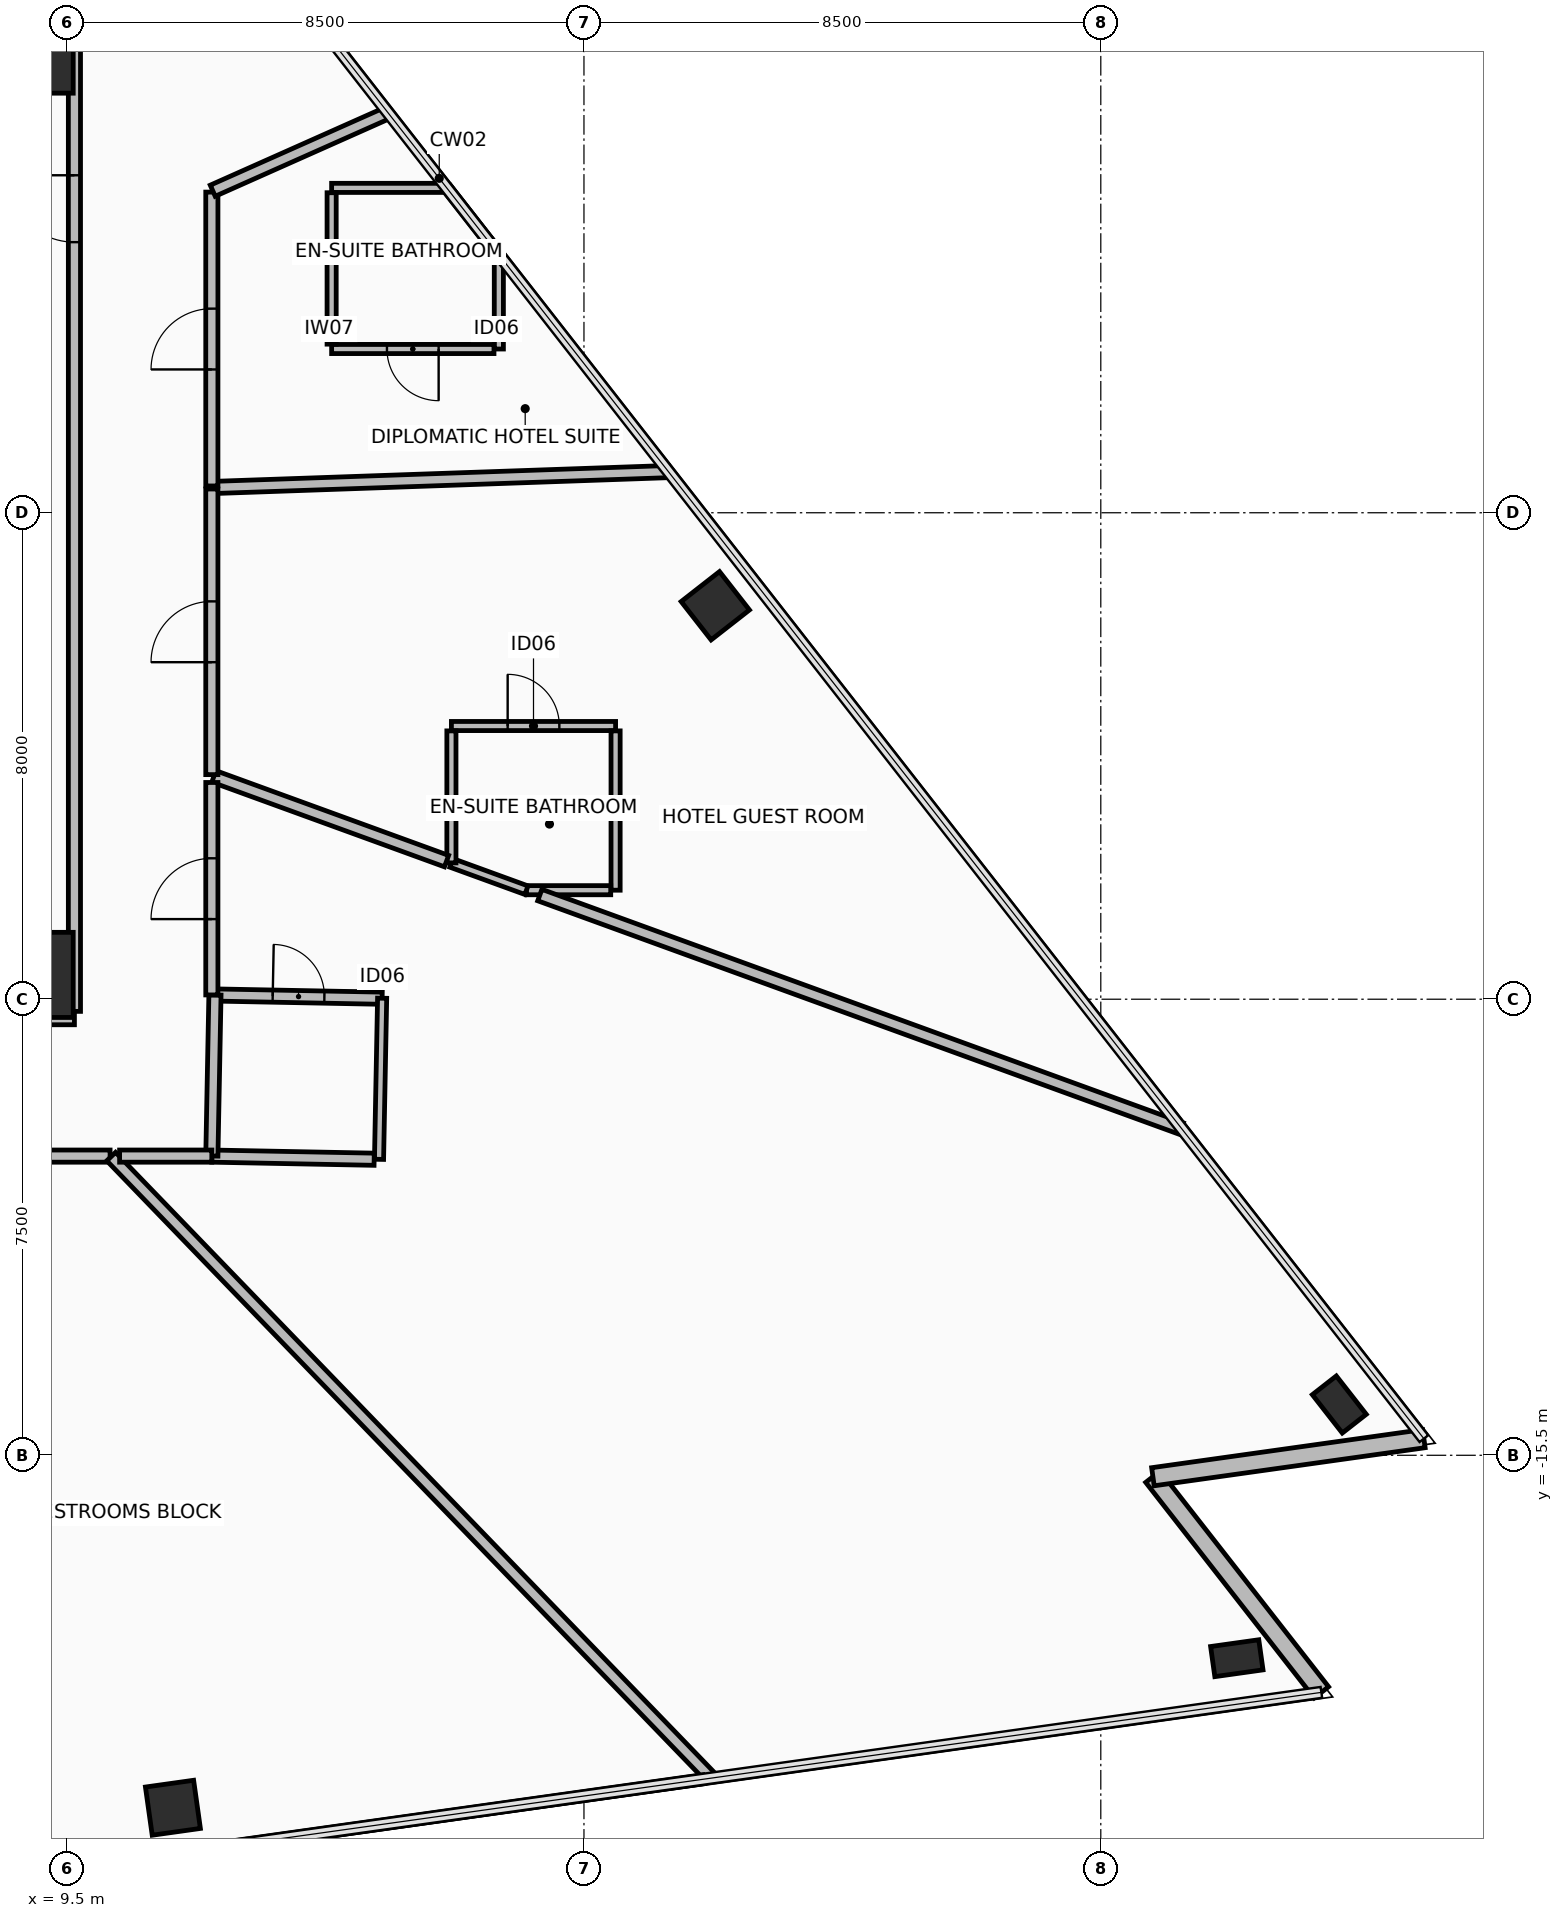
"""IFC4 building model, lengths in metres.
Left out: names, types, materials, properties, quantities, classifications, styles, units other than length and angle.
Written with IfcOpenShell. Run it as: python <this file> out.ifc"""

import sys

from ifc_helpers import new_model, si_unit, direction, frame, frame_2d, origin, origin_2d, place, context, subcontext, project, spatial, rectangle, hollow_rectangle, extrude, element, fill, save


model = new_model("IFC4")
c1 = context("Model", 3, precision=1e-05, world=origin(), true_north=direction((0.0, 1.0)))
c2 = subcontext(c1, "Body", "Model", "MODEL_VIEW")
j1 = project(units=[si_unit("LENGTHUNIT", "METRE"), si_unit("PLANEANGLEUNIT", "RADIAN")], contexts=[c1])
p1 = place(None, origin())
s1 = spatial("IfcSite", under=j1, at=p1, CompositionType="ELEMENT")
p2 = place(p1, origin())
s2 = spatial("IfcBuilding", under=s1, at=p2, CompositionType="ELEMENT")
p3 = place(p2, frame((0.0, 0.0, 63.85)))
s3 = spatial("IfcBuildingStorey", under=s2, at=p3, CompositionType="ELEMENT", Elevation=63.85)
for number, where, z_axis, x_axis in (
    (1, (8.9, -7.6, 0.0), (0.0, 0.0, 1.0), (1.0, 0.0, 0.0)),
    (2, (8.9, 7.6, 0.0), (0.0, 0.0, 1.0), (1.0, 0.0, 0.0)),
):
    element("IfcColumn", number, at=place(p3, frame(where, z_axis=z_axis, x_axis=x_axis)), inside=s3, PredefinedType="COLUMN", context=c2, shape_type="SweptSolid", body=[
        extrude(rectangle(XDim=1.4, YDim=1.4, at=origin_2d()), origin(), (0.0, 0.0, 1.0), 3.45),
    ])
p4 = place(p3, frame((11.24, -21.296, 0.0), z_axis=(0.0, 0.0, 1.0), x_axis=(0.990268068742, 0.13917310096, 0.0)))
e3 = element("IfcColumn", 3, at=p4, inside=s3, PredefinedType="COLUMN", context=c2, shape_type="SweptSolid", body=[
    extrude(hollow_rectangle(XDim=0.8, YDim=0.8, WallThickness=0.045, at=origin_2d()), origin(), (0.0, 0.0, 1.0), 3.45),
])
for number, where, z_axis, x_axis in (
    (4, (28.737, -18.837, 0.0), (0.0, 0.0, 1.0), (0.99, 0.139, 0.0)),
    (5, (30.423, -14.665, 0.0), (0.0, 0.0, 1.0), (-0.616, 0.788, 0.0)),
):
    element("IfcColumn", number, at=place(p3, frame(where, z_axis=z_axis, x_axis=x_axis)), inside=s3, PredefinedType="COLUMN", context=c2, shape_type="SweptSolid", body=[
        extrude(hollow_rectangle(XDim=0.5, YDim=0.8, WallThickness=0.04, at=origin_2d()), origin(), (0.0, 0.0, 1.0), 3.45),
    ])
p5 = place(p3, frame((20.16, -1.529, 0.0), z_axis=(0.0, 0.0, 1.0), x_axis=(-0.615661475326, 0.788010753607, 0.0)))
e6 = element("IfcColumn", 6, at=p5, inside=s3, PredefinedType="COLUMN", context=c2, shape_type="SweptSolid", body=[
    extrude(hollow_rectangle(XDim=0.8, YDim=0.8, WallThickness=0.045, at=origin_2d()), origin(), (0.0, 0.0, 1.0), 3.45),
])
p6 = place(p3, frame((30.128, -19.399, 0.0), z_axis=(0.0, 0.0, 1.0), x_axis=(-0.615621932091, 0.78804164657, 0.0)))
e7 = element("IfcWall", 7, at=p6, inside=s3, PredefinedType="STANDARD", context=c2, shape_type="SweptSolid", body=[
    extrude(rectangle(XDim=4.5, YDim=0.3, at=frame_2d((2.25, 0.0))), origin(), (0.0, 0.0, 1.0), 2.47),
])
p7 = place(p3, frame((27.357, -15.853, 0.0), z_axis=(0.0, 0.0, 1.0), x_axis=(0.990269200152, 0.139165050317, 0.0)))
e8 = element("IfcWall", 8, at=p7, inside=s3, PredefinedType="STANDARD", context=c2, shape_type="SweptSolid", body=[
    extrude(rectangle(XDim=4.5, YDim=0.3, at=frame_2d((2.25, 0.0))), origin(), (0.0, 0.0, 1.0), 2.47),
])
p8 = place(p3, frame((-9.62, -8.32, 0.0), z_axis=(0.0, 0.0, 1.0), x_axis=(1.0, 0.0, 0.0)))
e9 = element("IfcWall", 9, at=p8, inside=s3, PredefinedType="PARTITIONING", context=c2, shape_type="SweptSolid", body=[
    extrude(rectangle(XDim=19.24, YDim=0.2, at=frame_2d((9.62, 0.0))), origin(), (0.0, 0.0, 1.0), 2.67),
])
p9 = place(p8, frame((15.02, 0.0, 0.0)))
e10 = element("IfcOpeningElement", 10, at=p9, cuts=e9, PredefinedType="OPENING", context=c2, shape_type="SweptSolid", body=[
    extrude(rectangle(XDim=0.9, YDim=2.1, at=frame_2d((0.45, 1.05))), frame((0.0, 0.11, 0.0), z_axis=(0.0, -1.0, 0.0), x_axis=(1.0, 0.0, 0.0)), (0.0, 0.0, 1.0), 0.22),
])
p10 = place(p3, frame((9.62, -8.2, 0.0), z_axis=(0.0, 0.0, 1.0), x_axis=(0.0, 1.0, 0.0)))
e11 = element("IfcWall", 11, at=p10, inside=s3, PredefinedType="PARTITIONING", context=c2, shape_type="SweptSolid", body=[
    extrude(rectangle(XDim=16.4, YDim=0.2, at=frame_2d((8.2, 0.0))), origin(), (0.0, 0.0, 1.0), 2.67),
])
p11 = place(p10, frame((12.65, 0.0, 0.0)))
e12 = element("IfcOpeningElement", 12, at=p11, cuts=e11, PredefinedType="OPENING", context=c2, shape_type="SweptSolid", body=[
    extrude(rectangle(XDim=1.1, YDim=2.15, at=frame_2d((0.55, 1.075))), frame((0.0, 0.11, 0.0), z_axis=(0.0, -1.0, 0.0), x_axis=(1.0, 0.0, 0.0)), (0.0, 0.0, 1.0), 0.22),
])
p12 = place(p3, frame((13.85, 5.343, 0.0), z_axis=(0.0, 0.0, 1.0), x_axis=(1.0, 0.0, 0.0)))
e13 = element("IfcWall", 13, at=p12, inside=s3, PredefinedType="PARTITIONING", context=c2, shape_type="SweptSolid", body=[
    extrude(rectangle(XDim=1.893, YDim=0.15, at=frame_2d((0.946, 0.0))), origin(), (0.0, 0.0, 1.0), 2.47),
])
p13 = place(p3, frame((15.743, 5.343, 0.0), z_axis=(0.0, 0.0, 1.0), x_axis=(0.615650847495, -0.788019056862, 0.0)))
e14 = element("IfcWall", 14, at=p13, inside=s3, PredefinedType="PARTITIONING", context=c2, shape_type="SweptSolid", body=[
    extrude(rectangle(XDim=1.392, YDim=0.15, at=frame_2d((0.696, 0.0))), origin(), (0.0, 0.0, 1.0), 3.275),
])
p14 = place(p3, frame((16.6, 4.246, 0.0), z_axis=(0.0, 0.0, 1.0), x_axis=(0.0, -1.0, 0.0)))
e15 = element("IfcWall", 15, at=p14, inside=s3, PredefinedType="PARTITIONING", context=c2, shape_type="SweptSolid", body=[
    extrude(rectangle(XDim=1.553, YDim=0.15, at=frame_2d((0.776, 0.0))), origin(), (0.0, 0.0, 1.0), 2.47),
])
p15 = place(p3, frame((16.52, 2.693, 0.0), z_axis=(0.0, 0.0, 1.0), x_axis=(-1.0, 0.0, 0.0)))
e16 = element("IfcWall", 16, at=p15, inside=s3, PredefinedType="PARTITIONING", context=c2, shape_type="SweptSolid", body=[
    extrude(rectangle(XDim=2.67, YDim=0.15, at=frame_2d((1.335, 0.0))), origin(), (0.0, 0.0, 1.0), 3.275),
])
p16 = place(p15, frame((0.91, 0.0, 0.0)))
e17 = element("IfcOpeningElement", 17, at=p16, cuts=e16, PredefinedType="OPENING", context=c2, shape_type="SweptSolid", body=[
    extrude(rectangle(XDim=0.85, YDim=2.1, at=frame_2d((0.425, 1.05))), frame((0.0, 0.085, 0.0), z_axis=(0.0, -1.0, 0.0), x_axis=(1.0, 0.0, 0.0)), (0.0, 0.0, 1.0), 0.17),
])
p17 = place(p3, frame((13.85, 2.773, 0.0), z_axis=(0.0, 0.0, 1.0), x_axis=(0.0, 1.0, 0.0)))
e18 = element("IfcWall", 18, at=p17, inside=s3, PredefinedType="PARTITIONING", context=c2, shape_type="SweptSolid", body=[
    extrude(rectangle(XDim=2.49, YDim=0.15, at=frame_2d((1.245, 0.0))), origin(), (0.0, 0.0, 1.0), 3.275),
])
p18 = place(p3, frame((11.931, -7.93, 0.0), z_axis=(0.0, 0.0, 1.0), x_axis=(0.999812703389, -0.019353504647, 0.0)))
e19 = element("IfcWall", 19, at=p18, inside=s3, PredefinedType="PARTITIONING", context=c2, shape_type="SweptSolid", body=[
    extrude(rectangle(XDim=2.75, YDim=0.2, at=frame_2d((1.375, 0.0))), origin(), (0.0, 0.0, 1.0), 3.275),
])
p19 = place(p18, frame((0.95, 0.0, 0.0)))
e20 = element("IfcOpeningElement", 20, at=p19, cuts=e19, PredefinedType="OPENING", context=c2, shape_type="SweptSolid", body=[
    extrude(rectangle(XDim=0.85, YDim=2.1, at=frame_2d((0.425, 1.05))), frame((0.0, 0.11, 0.0), z_axis=(0.0, -1.0, 0.0), x_axis=(1.0, 0.0, 0.0)), (0.0, 0.0, 1.0), 0.22),
])
p20 = place(p3, frame((14.681, -7.984, 0.0), z_axis=(0.0, 0.0, 1.0), x_axis=(-0.01934764942, -0.999812816712, 0.0)))
e21 = element("IfcWall", 21, at=p20, inside=s3, PredefinedType="PARTITIONING", context=c2, shape_type="SweptSolid", body=[
    extrude(rectangle(XDim=2.65, YDim=0.15, at=frame_2d((1.325, 0.0))), origin(), (0.0, 0.0, 1.0), 2.67),
])
p21 = place(p3, frame((14.55, -10.632, 0.0), z_axis=(0.0, 0.0, 1.0), x_axis=(-0.999813887268, 0.019292247848, 0.0)))
e22 = element("IfcWall", 22, at=p21, inside=s3, PredefinedType="PARTITIONING", context=c2, shape_type="SweptSolid", body=[
    extrude(rectangle(XDim=2.67, YDim=0.2, at=frame_2d((1.335, 0.0))), origin(), (0.0, 0.0, 1.0), 2.67),
])
p22 = place(p3, frame((11.88, -10.579, 0.0), z_axis=(0.0, 0.0, 1.0), x_axis=(0.019356564513, 0.999812644154, 0.0)))
e23 = element("IfcWall", 23, at=p22, inside=s3, PredefinedType="PARTITIONING", context=c2, shape_type="SweptSolid", body=[
    extrude(rectangle(XDim=2.649, YDim=0.2, at=frame_2d((1.324, 0.0))), origin(), (0.0, 0.0, 1.0), 2.67),
])
p23 = place(p3, frame((15.82, -3.507, 0.0), z_axis=(0.0, 0.0, 1.0), x_axis=(1.0, 0.0, 0.0)))
e24 = element("IfcWall", 24, at=p23, inside=s3, PredefinedType="PARTITIONING", context=c2, shape_type="SweptSolid", body=[
    extrude(rectangle(XDim=2.7, YDim=0.15, at=frame_2d((1.35, 0.0))), origin(), (0.0, 0.0, 1.0), 2.67),
])
p24 = place(p23, frame((0.925, 0.0, 0.0)))
e25 = element("IfcOpeningElement", 25, at=p24, cuts=e24, PredefinedType="OPENING", context=c2, shape_type="SweptSolid", body=[
    extrude(rectangle(XDim=0.85, YDim=2.1, at=frame_2d((0.425, 1.05))), frame((0.0, 0.085, 0.0), z_axis=(0.0, -1.0, 0.0), x_axis=(1.0, 0.0, 0.0)), (0.0, 0.0, 1.0), 0.17),
])
p25 = place(p3, frame((18.52, -3.587, 0.0), z_axis=(0.0, 0.0, 1.0), x_axis=(0.0, -1.0, 0.0)))
e26 = element("IfcWall", 26, at=p25, inside=s3, PredefinedType="PARTITIONING", context=c2, shape_type="SweptSolid", body=[
    extrude(rectangle(XDim=2.62, YDim=0.15, at=frame_2d((1.31, 0.0))), origin(), (0.0, 0.0, 1.0), 2.87),
])
p26 = place(p3, frame((18.44, -6.207, 0.0), z_axis=(0.0, 0.0, 1.0), x_axis=(-1.0, 0.0, 0.0)))
e27 = element("IfcWall", 27, at=p26, inside=s3, PredefinedType="PARTITIONING", context=c2, shape_type="SweptSolid", body=[
    extrude(rectangle(XDim=1.386, YDim=0.15, at=frame_2d((0.693, 0.0))), origin(), (0.0, 0.0, 1.0), 3.275),
])
p27 = place(p3, frame((17.054, -6.207, 0.0), z_axis=(0.0, 0.0, 1.0), x_axis=(-0.939663072244, 0.342101316369, 0.0)))
e28 = element("IfcWall", 28, at=p27, inside=s3, PredefinedType="PARTITIONING", context=c2, shape_type="SweptSolid", body=[
    extrude(rectangle(XDim=1.313, YDim=0.15, at=frame_2d((0.657, 0.0))), origin(), (0.0, 0.0, 1.0), 3.275),
])
p28 = place(p3, frame((15.82, -5.758, 0.0), z_axis=(0.0, 0.0, 1.0), x_axis=(0.0, 1.0, 0.0)))
e29 = element("IfcWall", 29, at=p28, inside=s3, PredefinedType="PARTITIONING", context=c2, shape_type="SweptSolid", body=[
    extrude(rectangle(XDim=2.171, YDim=0.15, at=frame_2d((1.085, 0.0))), origin(), (0.0, 0.0, 1.0), 2.67),
])
p29 = place(p3, frame((3.472, -10.58, 0.0), z_axis=(0.0, 0.0, 1.0), x_axis=(1.0, 0.0, 0.0)))
e30 = element("IfcWall", 30, at=p29, inside=s3, PredefinedType="PARTITIONING", context=c2, shape_type="SweptSolid", body=[
    extrude(rectangle(XDim=6.734, YDim=0.2, at=frame_2d((3.367, 0.0))), origin(), (0.0, 0.0, 1.0), 2.67),
])
p30 = place(p29, frame((2.942, 0.0, 0.0)))
e31 = element("IfcOpeningElement", 31, at=p30, cuts=e30, PredefinedType="OPENING", context=c2, shape_type="SweptSolid", body=[
    extrude(rectangle(XDim=0.85, YDim=2.1, at=frame_2d((0.425, 1.05))), frame((0.0, 0.11, 0.0), z_axis=(0.0, -1.0, 0.0), x_axis=(1.0, 0.0, 0.0)), (0.0, 0.0, 1.0), 0.22),
])
p31 = place(p3, frame((10.224, -10.588, 0.0), z_axis=(0.0, 0.0, 1.0), x_axis=(0.694662887415, -0.719335438337, 0.0)))
e32 = element("IfcWall", 32, at=p31, inside=s3, PredefinedType="PARTITIONING", context=c2, shape_type="SweptSolid", body=[
    extrude(rectangle(XDim=14.209, YDim=0.2, at=frame_2d((7.105, 0.0))), origin(), (0.0, 0.0, 1.0), 2.47),
])
p32 = place(p3, frame((19.967, -20.827, 0.0), z_axis=(0.0, 0.0, 1.0), x_axis=(-0.990266579607, -0.139183696289, 0.0)))
e33 = element("IfcWall", 33, at=p32, inside=s3, PredefinedType="PARTITIONING", context=c2, shape_type="SweptSolid", body=[
    extrude(rectangle(XDim=12.726, YDim=0.15, at=frame_2d((6.363, 0.0))), origin(), (0.0, 0.0, 1.0), 3.275),
])
p33 = place(p3, frame((19.388, 0.677, 0.0), z_axis=(0.0, 0.0, 1.0), x_axis=(-0.999391073602, -0.034892434782, 0.0)))
e34 = element("IfcWall", 34, at=p33, inside=s3, PredefinedType="PARTITIONING", context=c2, shape_type="SweptSolid", body=[
    extrude(rectangle(XDim=7.487, YDim=0.2, at=frame_2d((3.743, 0.0))), origin(), (0.0, 0.0, 1.0), 2.47),
])
p34 = place(p3, frame((11.88, 0.441, 0.0), z_axis=(0.0, 0.0, 1.0), x_axis=(0.0, 1.0, 0.0)))
e35 = element("IfcWall", 35, at=p34, inside=s3, PredefinedType="PARTITIONING", context=c2, shape_type="SweptSolid", body=[
    extrude(rectangle(XDim=4.833, YDim=0.2, at=frame_2d((2.416, 0.0))), origin(), (0.0, 0.0, 1.0), 2.87),
])
p35 = place(p34, frame((1.916, 0.0, 0.0)))
e36 = element("IfcOpeningElement", 36, at=p35, cuts=e35, PredefinedType="OPENING", context=c2, shape_type="SweptSolid", body=[
    extrude(rectangle(XDim=1.0, YDim=2.15, at=frame_2d((0.5, 1.075))), frame((0.0, 0.11, 0.0), z_axis=(0.0, -1.0, 0.0), x_axis=(1.0, 0.0, 0.0)), (0.0, 0.0, 1.0), 0.22),
])
p36 = place(p3, frame((11.895, 5.296, 0.0), z_axis=(0.0, 0.0, 1.0), x_axis=(0.91355769443, 0.406709157689, 0.0)))
e37 = element("IfcWall", 37, at=p36, inside=s3, PredefinedType="PARTITIONING", context=c2, shape_type="SweptSolid", body=[
    extrude(rectangle(XDim=3.135, YDim=0.2, at=frame_2d((1.568, 0.0))), origin(), (0.0, 0.0, 1.0), 2.47),
])
p37 = place(p3, frame((11.914, -4.336, 0.0), z_axis=(0.0, 0.0, 1.0), x_axis=(0.93968309138, -0.342046324017, 0.0)))
e38 = element("IfcWall", 38, at=p37, inside=s3, PredefinedType="PARTITIONING", context=c2, shape_type="SweptSolid", body=[
    extrude(rectangle(XDim=4.072, YDim=0.2, at=frame_2d((2.036, 0.0))), origin(), (0.0, 0.0, 1.0), 2.67),
])
p38 = place(p3, frame((17.274, -6.287, 0.0), z_axis=(0.0, 0.0, 1.0), x_axis=(0.939692436803, -0.342020648814, 0.0)))
e39 = element("IfcWall", 39, at=p38, inside=s3, PredefinedType="PARTITIONING", context=c2, shape_type="SweptSolid", body=[
    extrude(rectangle(XDim=11.228, YDim=0.2, at=frame_2d((5.614, 0.0))), origin(), (0.0, 0.0, 1.0), 2.47),
])
p39 = place(p3, frame((10.363, -10.58, 0.0), z_axis=(0.0, 0.0, 1.0), x_axis=(1.0, 0.0, 0.0)))
e40 = element("IfcWall", 40, at=p39, inside=s3, PredefinedType="PARTITIONING", context=c2, shape_type="SweptSolid", body=[
    extrude(rectangle(XDim=1.516, YDim=0.2, at=frame_2d((0.758, 0.0))), origin(), (0.0, 0.0, 1.0), 3.275),
])
p40 = place(p3, frame((11.88, -7.929, 0.0), z_axis=(0.0, 0.0, 1.0), x_axis=(0.0, 1.0, 0.0)))
e41 = element("IfcWall", 41, at=p40, inside=s3, PredefinedType="PARTITIONING", context=c2, shape_type="SweptSolid", body=[
    extrude(rectangle(XDim=3.494, YDim=0.2, at=frame_2d((1.747, 0.0))), origin(), (0.0, 0.0, 1.0), 2.67),
])
p41 = place(p40, frame((1.247, 0.0, 0.0)))
e42 = element("IfcOpeningElement", 42, at=p41, cuts=e41, PredefinedType="OPENING", context=c2, shape_type="SweptSolid", body=[
    extrude(rectangle(XDim=1.0, YDim=2.15, at=frame_2d((0.5, 1.075))), frame((0.0, 0.11, 0.0), z_axis=(0.0, -1.0, 0.0), x_axis=(1.0, 0.0, 0.0)), (0.0, 0.0, 1.0), 0.22),
])
p42 = place(p3, frame((11.88, -4.306, 0.0), z_axis=(0.0, 0.0, 1.0), x_axis=(0.0, 1.0, 0.0)))
e43 = element("IfcWall", 43, at=p42, inside=s3, PredefinedType="PARTITIONING", context=c2, shape_type="SweptSolid", body=[
    extrude(rectangle(XDim=4.697, YDim=0.2, at=frame_2d((2.349, 0.0))), origin(), (0.0, 0.0, 1.0), 3.275),
])
p43 = place(p42, frame((1.849, 0.0, 0.0)))
e44 = element("IfcOpeningElement", 44, at=p43, cuts=e43, PredefinedType="OPENING", context=c2, shape_type="SweptSolid", body=[
    extrude(rectangle(XDim=1.0, YDim=2.15, at=frame_2d((0.5, 1.075))), frame((0.0, 0.11, 0.0), z_axis=(0.0, -1.0, 0.0), x_axis=(1.0, 0.0, 0.0)), (0.0, 0.0, 1.0), 0.22),
])
p44 = place(p11, frame((1.1, 0.0, 0.0), z_axis=(0.0, 0.0, 1.0), x_axis=(-1.0, 0.0, 0.0)))
e45 = element("IfcDoor", 45, at=p44, inside=s3, OperationType="SINGLE_SWING_LEFT", PredefinedType="DOOR", context=c2, shape_type="SweptSolid", body=[
    extrude(rectangle(XDim=1.1, YDim=2.15, at=frame_2d((0.55, 1.075))), frame((0.0, 0.025, 0.0), z_axis=(0.0, -1.0, 0.0), x_axis=(1.0, 0.0, 0.0)), (0.0, 0.0, 1.0), 0.05),
])
fill(e12, e45)
p45 = place(p16, origin())
e46 = element("IfcDoor", 46, at=p45, inside=s3, OperationType="SINGLE_SWING_RIGHT", PredefinedType="DOOR", context=c2, shape_type="SweptSolid", body=[
    extrude(rectangle(XDim=0.85, YDim=2.1, at=frame_2d((0.425, 1.05))), frame((0.0, 0.025, 0.0), z_axis=(0.0, -1.0, 0.0), x_axis=(1.0, 0.0, 0.0)), (0.0, 0.0, 1.0), 0.05),
])
fill(e17, e46)
p46 = place(p19, origin())
e47 = element("IfcDoor", 47, at=p46, inside=s3, OperationType="SINGLE_SWING_RIGHT", PredefinedType="DOOR", context=c2, shape_type="SweptSolid", body=[
    extrude(rectangle(XDim=0.85, YDim=2.1, at=frame_2d((0.425, 1.05))), frame((0.0, 0.025, 0.0), z_axis=(0.0, -1.0, 0.0), x_axis=(1.0, 0.0, 0.0)), (0.0, 0.0, 1.0), 0.05),
])
fill(e20, e47)
p47 = place(p24, origin())
e48 = element("IfcDoor", 48, at=p47, inside=s3, OperationType="SINGLE_SWING_RIGHT", PredefinedType="DOOR", context=c2, shape_type="SweptSolid", body=[
    extrude(rectangle(XDim=0.85, YDim=2.1, at=frame_2d((0.425, 1.05))), frame((0.0, 0.025, 0.0), z_axis=(0.0, -1.0, 0.0), x_axis=(1.0, 0.0, 0.0)), (0.0, 0.0, 1.0), 0.05),
])
fill(e25, e48)
p48 = place(p35, origin())
e49 = element("IfcDoor", 49, at=p48, inside=s3, OperationType="SINGLE_SWING_LEFT", PredefinedType="DOOR", context=c2, shape_type="SweptSolid", body=[
    extrude(rectangle(XDim=1.0, YDim=2.15, at=frame_2d((0.5, 1.075))), frame((0.0, 0.025, 0.0), z_axis=(0.0, -1.0, 0.0), x_axis=(1.0, 0.0, 0.0)), (0.0, 0.0, 1.0), 0.05),
])
fill(e36, e49)
p49 = place(p41, origin())
e50 = element("IfcDoor", 50, at=p49, inside=s3, OperationType="SINGLE_SWING_LEFT", PredefinedType="DOOR", context=c2, shape_type="SweptSolid", body=[
    extrude(rectangle(XDim=1.0, YDim=2.15, at=frame_2d((0.5, 1.075))), frame((0.0, 0.025, 0.0), z_axis=(0.0, -1.0, 0.0), x_axis=(1.0, 0.0, 0.0)), (0.0, 0.0, 1.0), 0.05),
])
fill(e42, e50)
p50 = place(p43, origin())
e51 = element("IfcDoor", 51, at=p50, inside=s3, OperationType="SINGLE_SWING_LEFT", PredefinedType="DOOR", context=c2, shape_type="SweptSolid", body=[
    extrude(rectangle(XDim=1.0, YDim=2.15, at=frame_2d((0.5, 1.075))), frame((0.0, 0.025, 0.0), z_axis=(0.0, -1.0, 0.0), x_axis=(1.0, 0.0, 0.0)), (0.0, 0.0, 1.0), 0.05),
])
fill(e44, e51)
save(model, sys.argv[1])
